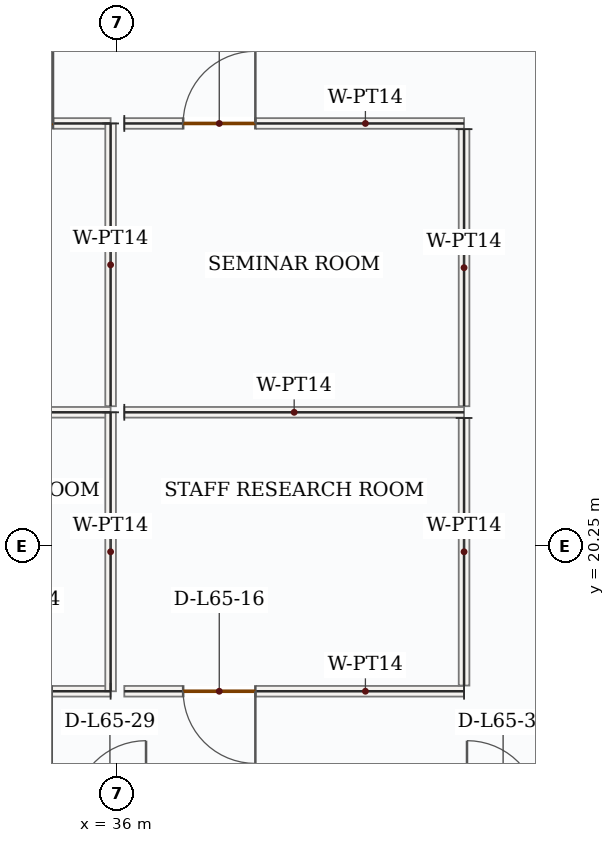
"""IFC4 building model, lengths in metres.
Left out: names, types, materials, properties, quantities, classifications, styles, units other than length and angle.
Written with IfcOpenShell. Run it as: python <this file> out.ifc"""

import sys

from ifc_helpers import new_model, si_unit, direction, frame, frame_2d, origin, place, context, subcontext, project, spatial, rectangle, extrude, source, transform, mapped, element, fill, save


model = new_model("IFC4")
c1 = context("Model", 3, precision=1e-05, world=origin(), true_north=direction((0.0, 1.0)))
c2 = subcontext(c1, "Body", "Model", "MODEL_VIEW")
j1 = project(units=[si_unit("LENGTHUNIT", "METRE"), si_unit("PLANEANGLEUNIT", "RADIAN")], contexts=[c1])
p1 = place(None, origin())
s1 = spatial("IfcSite", under=j1, at=p1, CompositionType="ELEMENT")
p2 = place(p1, origin())
s2 = spatial("IfcBuilding", under=s1, at=p2, CompositionType="ELEMENT")
p3 = place(p2, frame((0.0, 0.0, 272.85)))
s3 = spatial("IfcBuildingStorey", under=s2, at=p3, CompositionType="ELEMENT", Elevation=272.85)
p4 = place(p3, frame((35.91, 18.34, 0.0), z_axis=(0.0, 0.0, 1.0), x_axis=(-1.0, 0.0, 0.0)))
e1 = element("IfcWall", 1, at=p4, inside=s3, PredefinedType="PARTITIONING", context=c2, shape_type="SweptSolid", body=[
    extrude(rectangle(XDim=4.47, YDim=0.14, at=frame_2d((2.235, 0.0))), origin(), (0.0, 0.0, 1.0), 3.5),
])
p5 = place(p4, frame((0.774, 0.0, 0.0)))
e2 = element("IfcOpeningElement", 2, at=p5, cuts=e1, PredefinedType="OPENING", context=c2, shape_type="SweptSolid", body=[
    extrude(rectangle(XDim=0.95, YDim=2.15, at=frame_2d((0.475, 1.075))), frame((0.0, 0.08, 0.0), z_axis=(0.0, -1.0, 0.0), x_axis=(1.0, 0.0, 0.0)), (0.0, 0.0, 1.0), 0.16),
])
m1 = source(origin(), c2, "Body", "SweptSolid", [
    extrude(rectangle(XDim=4.395, YDim=0.14, at=frame_2d((2.198, 0.0))), origin(), (0.0, 0.0, 1.0), 3.5),
])
p6 = place(p3, frame((31.515, 22.01, 0.0), z_axis=(0.0, 0.0, 1.0), x_axis=(1.0, 0.0, 0.0)))
e3 = element("IfcWall", 3, at=p6, inside=s3, PredefinedType="PARTITIONING", context=c2, shape_type="MappedRepresentation", body=[
    mapped(m1, transform((0.0, 0.0, 0.0), x_axis=(1.0, 0.0, 0.0), y_axis=(0.0, 1.0, 0.0), z_axis=(0.0, 0.0, 1.0), scale=1.0)),
])
m2 = source(origin(), c2, "Body", "SweptSolid", [
    extrude(rectangle(XDim=3.67, YDim=0.14, at=frame_2d((1.835, 0.0))), origin(), (0.0, 0.0, 1.0), 3.5),
])
p7 = place(p3, frame((35.91, 22.01, 0.0), z_axis=(0.0, 0.0, 1.0), x_axis=(0.0, -1.0, 0.0)))
e4 = element("IfcWall", 4, at=p7, inside=s3, PredefinedType="PARTITIONING", context=c2, shape_type="MappedRepresentation", body=[
    mapped(m2, transform((0.0, 0.0, 0.0), x_axis=(1.0, 0.0, 0.0), y_axis=(0.0, 1.0, 0.0), z_axis=(0.0, 0.0, 1.0), scale=1.0)),
])
p8 = place(p3, frame((40.56, 18.34, 0.0), z_axis=(0.0, 0.0, 1.0), x_axis=(-1.0, 0.0, 0.0)))
e5 = element("IfcWall", 5, at=p8, inside=s3, PredefinedType="PARTITIONING", context=c2, shape_type="SweptSolid", body=[
    extrude(rectangle(XDim=4.47, YDim=0.14, at=frame_2d((2.235, 0.0))), origin(), (0.0, 0.0, 1.0), 3.5),
])
p9 = place(p8, frame((2.746, 0.0, 0.0)))
e6 = element("IfcOpeningElement", 6, at=p9, cuts=e5, PredefinedType="OPENING", context=c2, shape_type="SweptSolid", body=[
    extrude(rectangle(XDim=0.95, YDim=2.15, at=frame_2d((0.475, 1.075))), frame((0.0, 0.08, 0.0), z_axis=(0.0, -1.0, 0.0), x_axis=(1.0, 0.0, 0.0)), (0.0, 0.0, 1.0), 0.16),
])
m3 = source(origin(), c2, "Body", "SweptSolid", [
    extrude(rectangle(XDim=4.47, YDim=0.14, at=frame_2d((2.235, 0.0))), origin(), (0.0, 0.0, 1.0), 3.5),
])
p10 = place(p3, frame((36.09, 22.01, 0.0), z_axis=(0.0, 0.0, 1.0), x_axis=(1.0, 0.0, 0.0)))
e7 = element("IfcWall", 7, at=p10, inside=s3, PredefinedType="PARTITIONING", context=c2, shape_type="MappedRepresentation", body=[
    mapped(m3, transform((0.0, 0.0, 0.0), x_axis=(1.0, 0.0, 0.0), y_axis=(0.0, 1.0, 0.0), z_axis=(0.0, 0.0, 1.0), scale=1.0)),
])
m4 = source(origin(), c2, "Body", "SweptSolid", [
    extrude(rectangle(XDim=3.52, YDim=0.14, at=frame_2d((1.76, 0.0))), origin(), (0.0, 0.0, 1.0), 3.5),
])
p11 = place(p3, frame((40.56, 21.935, 0.0), z_axis=(0.0, 0.0, 1.0), x_axis=(0.0, -1.0, 0.0)))
e8 = element("IfcWall", 8, at=p11, inside=s3, PredefinedType="PARTITIONING", context=c2, shape_type="MappedRepresentation", body=[
    mapped(m4, transform((0.0, 0.0, 0.0), x_axis=(1.0, 0.0, 0.0), y_axis=(0.0, 1.0, 0.0), z_axis=(0.0, 0.0, 1.0), scale=1.0)),
])
p12 = place(p3, frame((31.515, 25.81, 0.0), z_axis=(0.0, 0.0, 1.0), x_axis=(1.0, 0.0, 0.0)))
e9 = element("IfcWall", 9, at=p12, inside=s3, PredefinedType="PARTITIONING", context=c2, shape_type="SweptSolid", body=[
    extrude(rectangle(XDim=4.395, YDim=0.14, at=frame_2d((2.198, 0.0))), origin(), (0.0, 0.0, 1.0), 3.5),
])
p13 = place(p12, frame((2.687, 0.0, 0.0)))
e10 = element("IfcOpeningElement", 10, at=p13, cuts=e9, PredefinedType="OPENING", context=c2, shape_type="SweptSolid", body=[
    extrude(rectangle(XDim=0.95, YDim=2.15, at=frame_2d((0.475, 1.075))), frame((0.0, 0.08, 0.0), z_axis=(0.0, -1.0, 0.0), x_axis=(1.0, 0.0, 0.0)), (0.0, 0.0, 1.0), 0.16),
])
m5 = source(origin(), c2, "Body", "SweptSolid", [
    extrude(rectangle(XDim=3.72, YDim=0.14, at=frame_2d((1.86, 0.0))), origin(), (0.0, 0.0, 1.0), 3.5),
])
p14 = place(p3, frame((35.91, 25.81, 0.0), z_axis=(0.0, 0.0, 1.0), x_axis=(0.0, -1.0, 0.0)))
e11 = element("IfcWall", 11, at=p14, inside=s3, PredefinedType="PARTITIONING", context=c2, shape_type="MappedRepresentation", body=[
    mapped(m5, transform((0.0, 0.0, 0.0), x_axis=(1.0, 0.0, 0.0), y_axis=(0.0, 1.0, 0.0), z_axis=(0.0, 0.0, 1.0), scale=1.0)),
])
p15 = place(p3, frame((36.09, 25.81, 0.0), z_axis=(0.0, 0.0, 1.0), x_axis=(1.0, 0.0, 0.0)))
e12 = element("IfcWall", 12, at=p15, inside=s3, PredefinedType="PARTITIONING", context=c2, shape_type="SweptSolid", body=[
    extrude(rectangle(XDim=4.47, YDim=0.14, at=frame_2d((2.235, 0.0))), origin(), (0.0, 0.0, 1.0), 3.5),
])
p16 = place(p15, frame((0.774, 0.0, 0.0)))
e13 = element("IfcOpeningElement", 13, at=p16, cuts=e12, PredefinedType="OPENING", context=c2, shape_type="SweptSolid", body=[
    extrude(rectangle(XDim=0.95, YDim=2.15, at=frame_2d((0.475, 1.075))), frame((0.0, 0.08, 0.0), z_axis=(0.0, -1.0, 0.0), x_axis=(1.0, 0.0, 0.0)), (0.0, 0.0, 1.0), 0.16),
])
m6 = source(origin(), c2, "Body", "SweptSolid", [
    extrude(rectangle(XDim=3.645, YDim=0.14, at=frame_2d((1.823, 0.0))), origin(), (0.0, 0.0, 1.0), 3.5),
])
p17 = place(p3, frame((40.56, 25.735, 0.0), z_axis=(0.0, 0.0, 1.0), x_axis=(0.0, -1.0, 0.0)))
e14 = element("IfcWall", 14, at=p17, inside=s3, PredefinedType="PARTITIONING", context=c2, shape_type="MappedRepresentation", body=[
    mapped(m6, transform((0.0, 0.0, 0.0), x_axis=(1.0, 0.0, 0.0), y_axis=(0.0, 1.0, 0.0), z_axis=(0.0, 0.0, 1.0), scale=1.0)),
])
m7 = source(origin(), c2, "Body", "SweptSolid", [
    extrude(rectangle(XDim=0.95, YDim=2.15, at=frame_2d((0.475, 1.075))), frame((0.0, 0.025, 0.0), z_axis=(0.0, -1.0, 0.0), x_axis=(1.0, 0.0, 0.0)), (0.0, 0.0, 1.0), 0.05),
])
p18 = place(p13, origin())
e15 = element("IfcDoor", 15, at=p18, inside=s3, OperationType="SINGLE_SWING_RIGHT", PredefinedType="DOOR", context=c2, shape_type="MappedRepresentation", body=[
    mapped(m7, transform((0.0, 0.0, 0.0), x_axis=(1.0, 0.0, 0.0), y_axis=(0.0, 1.0, 0.0), z_axis=(0.0, 0.0, 1.0), scale=1.0)),
])
fill(e10, e15)
p19 = place(p9, origin())
e16 = element("IfcDoor", 16, at=p19, inside=s3, OperationType="SINGLE_SWING_LEFT", PredefinedType="DOOR", context=c2, shape_type="MappedRepresentation", body=[
    mapped(m7, transform((0.0, 0.0, 0.0), x_axis=(1.0, 0.0, 0.0), y_axis=(0.0, 1.0, 0.0), z_axis=(0.0, 0.0, 1.0), scale=1.0)),
])
fill(e6, e16)
p20 = place(p16, origin())
e17 = element("IfcDoor", 17, at=p20, inside=s3, OperationType="SINGLE_SWING_RIGHT", PredefinedType="DOOR", context=c2, shape_type="MappedRepresentation", body=[
    mapped(m7, transform((0.0, 0.0, 0.0), x_axis=(1.0, 0.0, 0.0), y_axis=(0.0, 1.0, 0.0), z_axis=(0.0, 0.0, 1.0), scale=1.0)),
])
fill(e13, e17)
save(model, sys.argv[1])
